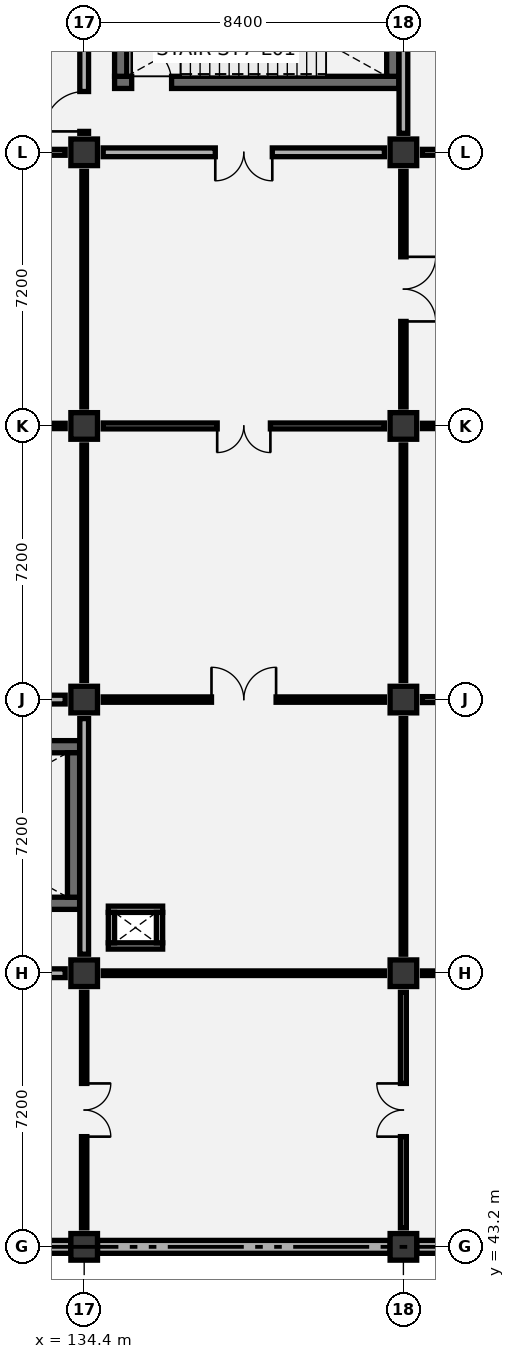
"""IFC4 building model, lengths in metres.
Left out: names, types, materials, properties, quantities, classifications, styles, units other than length and angle.
Written with IfcOpenShell. Run it as: python <this file> out.ifc"""

import sys

from ifc_helpers import new_model, si_unit, direction, frame, frame_2d, origin, origin_2d, place, context, subcontext, project, spatial, rectangle, extrude, element, fill, save


model = new_model("IFC4")
c1 = context("Model", 3, precision=1e-05, world=origin(), true_north=direction((0.0, 1.0)))
c2 = subcontext(c1, "Body", "Model", "MODEL_VIEW")
j1 = project(units=[si_unit("LENGTHUNIT", "METRE"), si_unit("PLANEANGLEUNIT", "RADIAN")], contexts=[c1])
p1 = place(None, origin())
s1 = spatial("IfcSite", under=j1, at=p1, CompositionType="ELEMENT")
p2 = place(p1, origin())
s2 = spatial("IfcBuilding", under=s1, at=p2, CompositionType="ELEMENT")
p3 = place(p2, frame((0.0, 0.0, 6.0)))
s3 = spatial("IfcBuildingStorey", under=s2, at=p3, CompositionType="ELEMENT", Elevation=6.0)
for number, where, z_axis, x_axis in (
    (1, (134.4, 43.2, 0.0), (0.0, 0.0, 1.0), (1.0, 0.0, 0.0)),
    (2, (134.4, 50.4, 0.0), (0.0, 0.0, 1.0), (1.0, 0.0, 0.0)),
    (3, (134.4, 57.6, 0.0), (0.0, 0.0, 1.0), (1.0, 0.0, 0.0)),
    (4, (134.4, 64.8, 0.0), (0.0, 0.0, 1.0), (1.0, 0.0, 0.0)),
    (5, (134.4, 72.0, 0.0), (0.0, 0.0, 1.0), (1.0, 0.0, 0.0)),
    (6, (142.8, 43.2, 0.0), (0.0, 0.0, 1.0), (1.0, 0.0, 0.0)),
    (7, (142.8, 50.4, 0.0), (0.0, 0.0, 1.0), (1.0, 0.0, 0.0)),
    (8, (142.8, 57.6, 0.0), (0.0, 0.0, 1.0), (1.0, 0.0, 0.0)),
    (9, (142.8, 64.8, 0.0), (0.0, 0.0, 1.0), (1.0, 0.0, 0.0)),
    (10, (142.8, 72.0, 0.0), (0.0, 0.0, 1.0), (1.0, 0.0, 0.0)),
):
    element("IfcColumn", number, at=place(p3, frame(where, z_axis=z_axis, x_axis=x_axis)), inside=s3, PredefinedType="COLUMN", context=c2, shape_type="SweptSolid", body=[
        extrude(rectangle(XDim=0.7, YDim=0.7, at=origin_2d()), origin(), (0.0, 0.0, 1.0), 5.4),
    ])
p4 = place(p3, frame((126.8, 52.24, 0.0), z_axis=(0.0, 0.0, 1.0), x_axis=(1.0, 0.0, 0.0)))
e11 = element("IfcWall", 11, at=p4, inside=s3, PredefinedType="SHEAR", context=c2, shape_type="SweptSolid", body=[
    extrude(rectangle(XDim=7.48, YDim=0.32, at=frame_2d((3.74, 0.0))), origin(), (0.0, 0.0, 1.0), 5.075),
])
p5 = place(p4, frame((0.45, 0.0, 0.0)))
e12 = element("IfcOpeningElement", 12, at=p5, cuts=e11, PredefinedType="OPENING", context=c2, shape_type="SweptSolid", body=[
    extrude(rectangle(XDim=1.05, YDim=2.15, at=frame_2d((0.525, 1.075))), frame((0.0, 0.17, 0.0), z_axis=(0.0, -1.0, 0.0), x_axis=(1.0, 0.0, 0.0)), (0.0, 0.0, 1.0), 0.34),
])
p6 = place(p3, frame((126.8, 56.36, 0.0), z_axis=(0.0, 0.0, 1.0), x_axis=(1.0, 0.0, 0.0)))
e13 = element("IfcWall", 13, at=p6, inside=s3, PredefinedType="SHEAR", context=c2, shape_type="SweptSolid", body=[
    extrude(rectangle(XDim=7.48, YDim=0.32, at=frame_2d((3.74, 0.0))), origin(), (0.0, 0.0, 1.0), 5.075),
])
p7 = place(p3, frame((134.12, 52.4, 0.0), z_axis=(0.0, 0.0, 1.0), x_axis=(0.0, 1.0, 0.0)))
e14 = element("IfcWall", 14, at=p7, inside=s3, PredefinedType="SHEAR", context=c2, shape_type="SweptSolid", body=[
    extrude(rectangle(XDim=3.8, YDim=0.32, at=frame_2d((1.9, 0.0))), origin(), (0.0, 0.0, 1.0), 5.075),
])
p8 = place(p3, frame((135.2, 73.84, 0.0), z_axis=(0.0, 0.0, 1.0), x_axis=(1.0, 0.0, 0.0)))
e15 = element("IfcWall", 15, at=p8, inside=s3, PredefinedType="SHEAR", context=c2, shape_type="SweptSolid", body=[
    extrude(rectangle(XDim=7.48, YDim=0.32, at=frame_2d((3.74, 0.0))), origin(), (0.0, 0.0, 1.0), 5.075),
])
p9 = place(p8, frame((0.45, 0.0, 0.0)))
e16 = element("IfcOpeningElement", 16, at=p9, cuts=e15, PredefinedType="OPENING", context=c2, shape_type="SweptSolid", body=[
    extrude(rectangle(XDim=1.05, YDim=2.15, at=frame_2d((0.525, 1.075))), frame((0.0, 0.17, 0.0), z_axis=(0.0, -1.0, 0.0), x_axis=(1.0, 0.0, 0.0)), (0.0, 0.0, 1.0), 0.34),
])
for number, where, z_axis, x_axis in (
    (17, (135.36, 74.0, 0.0), (0.0, 0.0, 1.0), (0.0, 1.0, 0.0)),
    (18, (142.52, 74.0, 0.0), (0.0, 0.0, 1.0), (0.0, 1.0, 0.0)),
):
    element("IfcWall", number, at=place(p3, frame(where, z_axis=z_axis, x_axis=x_axis)), inside=s3, PredefinedType="SHEAR", context=c2, shape_type="SweptSolid", body=[
        extrude(rectangle(XDim=3.8, YDim=0.32, at=frame_2d((1.9, 0.0))), origin(), (0.0, 0.0, 1.0), 5.075),
    ])
for number, where, z_axis, x_axis in (
    (19, (126.35, 43.2, 0.0), (0.0, 0.0, 1.0), (1.0, 0.0, 0.0)),
    (20, (134.75, 43.2, 0.0), (0.0, 0.0, 1.0), (1.0, 0.0, 0.0)),
):
    element("IfcWall", number, at=place(p3, frame(where, z_axis=z_axis, x_axis=x_axis)), inside=s3, PredefinedType="SOLIDWALL", context=c2, shape_type="SweptSolid", body=[
        extrude(rectangle(XDim=7.7, YDim=0.34, at=frame_2d((3.85, 0.0))), origin(), (0.0, 0.0, 1.0), 4.42),
    ])
p10 = place(p3, frame((143.15, 43.2, 0.0), z_axis=(0.0, 0.0, 1.0), x_axis=(1.0, 0.0, 0.0)))
e21 = element("IfcWall", 21, at=p10, inside=s3, PredefinedType="SOLIDWALL", context=c2, shape_type="SweptSolid", body=[
    extrude(rectangle(XDim=7.7, YDim=0.34, at=frame_2d((3.85, 0.0))), origin(), (0.0, 0.0, 1.0), 4.42),
])
for number, where, z_axis, x_axis in (
    (22, (135.035, 51.117, 0.0), (0.0, 0.0, 1.0), (1.0, 0.0, 0.0)),
    (23, (135.035, 52.083, 0.0), (0.0, 0.0, 1.0), (1.0, 0.0, 0.0)),
):
    element("IfcWall", number, at=place(p3, frame(where, z_axis=z_axis, x_axis=x_axis)), inside=s3, PredefinedType="PARTITIONING", context=c2, shape_type="SweptSolid", body=[
        extrude(rectangle(XDim=1.43, YDim=0.165, at=frame_2d((0.715, 0.0))), origin(), (0.0, 0.0, 1.0), 5.075),
    ])
for number, where, z_axis, x_axis in (
    (24, (135.117, 51.2, 0.0), (0.0, 0.0, 1.0), (0.0, 1.0, 0.0)),
    (25, (136.383, 51.2, 0.0), (0.0, 0.0, 1.0), (0.0, 1.0, 0.0)),
):
    element("IfcWall", number, at=place(p3, frame(where, z_axis=z_axis, x_axis=x_axis)), inside=s3, PredefinedType="PARTITIONING", context=c2, shape_type="SweptSolid", body=[
        extrude(rectangle(XDim=0.8, YDim=0.165, at=frame_2d((0.4, 0.0))), origin(), (0.0, 0.0, 1.0), 5.075),
    ])
p11 = place(p3, frame((134.4, 43.7, 0.0), z_axis=(0.0, 0.0, 1.0), x_axis=(0.0, 1.0, 0.0)))
e26 = element("IfcWall", 26, at=p11, inside=s3, PredefinedType="PARTITIONING", context=c2, shape_type="SweptSolid", body=[
    extrude(rectangle(XDim=6.2, YDim=0.14, at=frame_2d((3.1, 0.0))), origin(), (0.0, 0.0, 1.0), 4.32),
])
p12 = place(p11, frame((2.4, 0.0, 0.0)))
e27 = element("IfcOpeningElement", 27, at=p12, cuts=e26, PredefinedType="OPENING", context=c2, shape_type="SweptSolid", body=[
    extrude(rectangle(XDim=1.4, YDim=2.15, at=frame_2d((0.7, 1.075))), frame((0.0, 0.08, 0.0), z_axis=(0.0, -1.0, 0.0), x_axis=(1.0, 0.0, 0.0)), (0.0, 0.0, 1.0), 0.16),
])
p13 = place(p3, frame((126.5, 50.4, 0.0), z_axis=(0.0, 0.0, 1.0), x_axis=(1.0, 0.0, 0.0)))
e28 = element("IfcWall", 28, at=p13, inside=s3, PredefinedType="PARTITIONING", context=c2, shape_type="SweptSolid", body=[
    extrude(rectangle(XDim=7.4, YDim=0.23, at=frame_2d((3.7, 0.0))), origin(), (0.0, 0.0, 1.0), 4.27),
])
p14 = place(p13, frame((2.95, 0.0, 0.0)))
e29 = element("IfcOpeningElement", 29, at=p14, cuts=e28, PredefinedType="OPENING", context=c2, shape_type="SweptSolid", body=[
    extrude(rectangle(XDim=1.5, YDim=2.15, at=frame_2d((0.75, 1.075))), frame((0.0, 0.125, 0.0), z_axis=(0.0, -1.0, 0.0), x_axis=(1.0, 0.0, 0.0)), (0.0, 0.0, 1.0), 0.25),
])
p15 = place(p3, frame((134.4, 50.9, 0.0), z_axis=(0.0, 0.0, 1.0), x_axis=(0.0, 1.0, 0.0)))
e30 = element("IfcWall", 30, at=p15, inside=s3, PredefinedType="PARTITIONING", context=c2, shape_type="SweptSolid", body=[
    extrude(rectangle(XDim=6.2, YDim=0.23, at=frame_2d((3.1, 0.0))), origin(), (0.0, 0.0, 1.0), 4.67),
])
p16 = place(p3, frame((126.5, 57.6, 0.0), z_axis=(0.0, 0.0, 1.0), x_axis=(1.0, 0.0, 0.0)))
e31 = element("IfcWall", 31, at=p16, inside=s3, PredefinedType="PARTITIONING", context=c2, shape_type="SweptSolid", body=[
    extrude(rectangle(XDim=7.4, YDim=0.23, at=frame_2d((3.7, 0.0))), origin(), (0.0, 0.0, 1.0), 4.27),
])
p17 = place(p3, frame((134.4, 58.1, 0.0), z_axis=(0.0, 0.0, 1.0), x_axis=(0.0, 1.0, 0.0)))
e32 = element("IfcWall", 32, at=p17, inside=s3, PredefinedType="PARTITIONING", context=c2, shape_type="SweptSolid", body=[
    extrude(rectangle(XDim=6.2, YDim=0.12, at=frame_2d((3.1, 0.0))), origin(), (0.0, 0.0, 1.0), 4.32),
])
p18 = place(p3, frame((126.5, 64.8, 0.0), z_axis=(0.0, 0.0, 1.0), x_axis=(1.0, 0.0, 0.0)))
e33 = element("IfcWall", 33, at=p18, inside=s3, PredefinedType="PARTITIONING", context=c2, shape_type="SweptSolid", body=[
    extrude(rectangle(XDim=7.4, YDim=0.14, at=frame_2d((3.7, 0.0))), origin(), (0.0, 0.0, 1.0), 4.27),
])
p19 = place(p18, frame((3.0, 0.0, 0.0)))
e34 = element("IfcOpeningElement", 34, at=p19, cuts=e33, PredefinedType="OPENING", context=c2, shape_type="SweptSolid", body=[
    extrude(rectangle(XDim=1.4, YDim=2.15, at=frame_2d((0.7, 1.075))), frame((0.0, 0.08, 0.0), z_axis=(0.0, -1.0, 0.0), x_axis=(1.0, 0.0, 0.0)), (0.0, 0.0, 1.0), 0.16),
])
p20 = place(p3, frame((134.4, 65.3, 0.0), z_axis=(0.0, 0.0, 1.0), x_axis=(0.0, 1.0, 0.0)))
e35 = element("IfcWall", 35, at=p20, inside=s3, PredefinedType="PARTITIONING", context=c2, shape_type="SweptSolid", body=[
    extrude(rectangle(XDim=6.2, YDim=0.12, at=frame_2d((3.1, 0.0))), origin(), (0.0, 0.0, 1.0), 4.78),
])
p21 = place(p3, frame((126.5, 72.0, 0.0), z_axis=(0.0, 0.0, 1.0), x_axis=(1.0, 0.0, 0.0)))
e36 = element("IfcWall", 36, at=p21, inside=s3, PredefinedType="PARTITIONING", context=c2, shape_type="SweptSolid", body=[
    extrude(rectangle(XDim=7.4, YDim=0.155, at=frame_2d((3.7, 0.0))), origin(), (0.0, 0.0, 1.0), 4.27),
])
p22 = place(p21, frame((2.85, 0.0, 0.0)))
e37 = element("IfcOpeningElement", 37, at=p22, cuts=e36, PredefinedType="OPENING", context=c2, shape_type="SweptSolid", body=[
    extrude(rectangle(XDim=1.7, YDim=2.25, at=frame_2d((0.85, 1.125))), frame((0.0, 0.087, 0.0), z_axis=(0.0, -1.0, 0.0), x_axis=(1.0, 0.0, 0.0)), (0.0, 0.0, 1.0), 0.175),
])
p23 = place(p3, frame((134.4, 72.5, 0.0), z_axis=(0.0, 0.0, 1.0), x_axis=(0.0, 1.0, 0.0)))
e38 = element("IfcWall", 38, at=p23, inside=s3, PredefinedType="PARTITIONING", context=c2, shape_type="SweptSolid", body=[
    extrude(rectangle(XDim=6.2, YDim=0.23, at=frame_2d((3.1, 0.0))), origin(), (0.0, 0.0, 1.0), 4.32),
])
p24 = place(p23, frame((0.05, 0.0, 0.0)))
e39 = element("IfcOpeningElement", 39, at=p24, cuts=e38, PredefinedType="OPENING", context=c2, shape_type="SweptSolid", body=[
    extrude(rectangle(XDim=1.05, YDim=2.15, at=frame_2d((0.525, 1.075))), frame((0.0, 0.125, 0.0), z_axis=(0.0, -1.0, 0.0), x_axis=(1.0, 0.0, 0.0)), (0.0, 0.0, 1.0), 0.25),
])
p25 = place(p3, frame((142.8, 43.7, 0.0), z_axis=(0.0, 0.0, 1.0), x_axis=(0.0, 1.0, 0.0)))
e40 = element("IfcWall", 40, at=p25, inside=s3, PredefinedType="PARTITIONING", context=c2, shape_type="SweptSolid", body=[
    extrude(rectangle(XDim=6.2, YDim=0.155, at=frame_2d((3.1, 0.0))), origin(), (0.0, 0.0, 1.0), 4.67),
])
p26 = place(p25, frame((2.4, 0.0, 0.0)))
e41 = element("IfcOpeningElement", 41, at=p26, cuts=e40, PredefinedType="OPENING", context=c2, shape_type="SweptSolid", body=[
    extrude(rectangle(XDim=1.4, YDim=2.15, at=frame_2d((0.7, 1.075))), frame((0.0, 0.087, 0.0), z_axis=(0.0, -1.0, 0.0), x_axis=(1.0, 0.0, 0.0)), (0.0, 0.0, 1.0), 0.175),
])
p27 = place(p3, frame((134.9, 50.4, 0.0), z_axis=(0.0, 0.0, 1.0), x_axis=(1.0, 0.0, 0.0)))
e42 = element("IfcWall", 42, at=p27, inside=s3, PredefinedType="PARTITIONING", context=c2, shape_type="SweptSolid", body=[
    extrude(rectangle(XDim=7.4, YDim=0.12, at=frame_2d((3.7, 0.0))), origin(), (0.0, 0.0, 1.0), 4.27),
])
p28 = place(p3, frame((142.8, 50.9, 0.0), z_axis=(0.0, 0.0, 1.0), x_axis=(0.0, 1.0, 0.0)))
e43 = element("IfcWall", 43, at=p28, inside=s3, PredefinedType="PARTITIONING", context=c2, shape_type="SweptSolid", body=[
    extrude(rectangle(XDim=6.2, YDim=0.12, at=frame_2d((3.1, 0.0))), origin(), (0.0, 0.0, 1.0), 4.32),
])
p29 = place(p3, frame((134.9, 57.6, 0.0), z_axis=(0.0, 0.0, 1.0), x_axis=(1.0, 0.0, 0.0)))
e44 = element("IfcWall", 44, at=p29, inside=s3, PredefinedType="PARTITIONING", context=c2, shape_type="SweptSolid", body=[
    extrude(rectangle(XDim=7.4, YDim=0.14, at=frame_2d((3.7, 0.0))), origin(), (0.0, 0.0, 1.0), 4.27),
])
p30 = place(p29, frame((2.85, 0.0, 0.0)))
e45 = element("IfcOpeningElement", 45, at=p30, cuts=e44, PredefinedType="OPENING", context=c2, shape_type="SweptSolid", body=[
    extrude(rectangle(XDim=1.7, YDim=2.25, at=frame_2d((0.85, 1.125))), frame((0.0, 0.08, 0.0), z_axis=(0.0, -1.0, 0.0), x_axis=(1.0, 0.0, 0.0)), (0.0, 0.0, 1.0), 0.16),
])
p31 = place(p3, frame((142.8, 58.1, 0.0), z_axis=(0.0, 0.0, 1.0), x_axis=(0.0, 1.0, 0.0)))
e46 = element("IfcWall", 46, at=p31, inside=s3, PredefinedType="PARTITIONING", context=c2, shape_type="SweptSolid", body=[
    extrude(rectangle(XDim=6.2, YDim=0.12, at=frame_2d((3.1, 0.0))), origin(), (0.0, 0.0, 1.0), 4.78),
])
p32 = place(p3, frame((134.9, 64.8, 0.0), z_axis=(0.0, 0.0, 1.0), x_axis=(1.0, 0.0, 0.0)))
e47 = element("IfcWall", 47, at=p32, inside=s3, PredefinedType="PARTITIONING", context=c2, shape_type="SweptSolid", body=[
    extrude(rectangle(XDim=7.4, YDim=0.155, at=frame_2d((3.7, 0.0))), origin(), (0.0, 0.0, 1.0), 4.27),
])
p33 = place(p32, frame((3.0, 0.0, 0.0)))
e48 = element("IfcOpeningElement", 48, at=p33, cuts=e47, PredefinedType="OPENING", context=c2, shape_type="SweptSolid", body=[
    extrude(rectangle(XDim=1.4, YDim=2.15, at=frame_2d((0.7, 1.075))), frame((0.0, 0.087, 0.0), z_axis=(0.0, -1.0, 0.0), x_axis=(1.0, 0.0, 0.0)), (0.0, 0.0, 1.0), 0.175),
])
p34 = place(p3, frame((142.8, 65.3, 0.0), z_axis=(0.0, 0.0, 1.0), x_axis=(0.0, 1.0, 0.0)))
e49 = element("IfcWall", 49, at=p34, inside=s3, PredefinedType="PARTITIONING", context=c2, shape_type="SweptSolid", body=[
    extrude(rectangle(XDim=6.2, YDim=0.14, at=frame_2d((3.1, 0.0))), origin(), (0.0, 0.0, 1.0), 4.32),
])
p35 = place(p34, frame((2.25, 0.0, 0.0)))
e50 = element("IfcOpeningElement", 50, at=p35, cuts=e49, PredefinedType="OPENING", context=c2, shape_type="SweptSolid", body=[
    extrude(rectangle(XDim=1.7, YDim=2.25, at=frame_2d((0.85, 1.125))), frame((0.0, 0.08, 0.0), z_axis=(0.0, -1.0, 0.0), x_axis=(1.0, 0.0, 0.0)), (0.0, 0.0, 1.0), 0.16),
])
p36 = place(p3, frame((134.9, 72.0, 0.0), z_axis=(0.0, 0.0, 1.0), x_axis=(1.0, 0.0, 0.0)))
e51 = element("IfcWall", 51, at=p36, inside=s3, PredefinedType="PARTITIONING", context=c2, shape_type="SweptSolid", body=[
    extrude(rectangle(XDim=7.4, YDim=0.23, at=frame_2d((3.7, 0.0))), origin(), (0.0, 0.0, 1.0), 4.27),
])
p37 = place(p36, frame((2.95, 0.0, 0.0)))
e52 = element("IfcOpeningElement", 52, at=p37, cuts=e51, PredefinedType="OPENING", context=c2, shape_type="SweptSolid", body=[
    extrude(rectangle(XDim=1.5, YDim=2.15, at=frame_2d((0.75, 1.075))), frame((0.0, 0.125, 0.0), z_axis=(0.0, -1.0, 0.0), x_axis=(1.0, 0.0, 0.0)), (0.0, 0.0, 1.0), 0.25),
])
p38 = place(p3, frame((142.8, 72.5, 0.0), z_axis=(0.0, 0.0, 1.0), x_axis=(0.0, 1.0, 0.0)))
e53 = element("IfcWall", 53, at=p38, inside=s3, PredefinedType="PARTITIONING", context=c2, shape_type="SweptSolid", body=[
    extrude(rectangle(XDim=6.2, YDim=0.23, at=frame_2d((3.1, 0.0))), origin(), (0.0, 0.0, 1.0), 4.57),
])
p39 = place(p3, frame((143.3, 50.4, 0.0), z_axis=(0.0, 0.0, 1.0), x_axis=(1.0, 0.0, 0.0)))
e54 = element("IfcWall", 54, at=p39, inside=s3, PredefinedType="PARTITIONING", context=c2, shape_type="SweptSolid", body=[
    extrude(rectangle(XDim=7.4, YDim=0.12, at=frame_2d((3.7, 0.0))), origin(), (0.0, 0.0, 1.0), 4.27),
])
p40 = place(p3, frame((143.3, 57.6, 0.0), z_axis=(0.0, 0.0, 1.0), x_axis=(1.0, 0.0, 0.0)))
e55 = element("IfcWall", 55, at=p40, inside=s3, PredefinedType="PARTITIONING", context=c2, shape_type="SweptSolid", body=[
    extrude(rectangle(XDim=7.4, YDim=0.155, at=frame_2d((3.7, 0.0))), origin(), (0.0, 0.0, 1.0), 4.27),
])
p41 = place(p40, frame((3.0, 0.0, 0.0)))
e56 = element("IfcOpeningElement", 56, at=p41, cuts=e55, PredefinedType="OPENING", context=c2, shape_type="SweptSolid", body=[
    extrude(rectangle(XDim=1.4, YDim=2.15, at=frame_2d((0.7, 1.075))), frame((0.0, 0.087, 0.0), z_axis=(0.0, -1.0, 0.0), x_axis=(1.0, 0.0, 0.0)), (0.0, 0.0, 1.0), 0.175),
])
p42 = place(p3, frame((143.3, 64.8, 0.0), z_axis=(0.0, 0.0, 1.0), x_axis=(1.0, 0.0, 0.0)))
e57 = element("IfcWall", 57, at=p42, inside=s3, PredefinedType="PARTITIONING", context=c2, shape_type="SweptSolid", body=[
    extrude(rectangle(XDim=7.4, YDim=0.14, at=frame_2d((3.7, 0.0))), origin(), (0.0, 0.0, 1.0), 4.27),
])
p43 = place(p42, frame((2.85, 0.0, 0.0)))
e58 = element("IfcOpeningElement", 58, at=p43, cuts=e57, PredefinedType="OPENING", context=c2, shape_type="SweptSolid", body=[
    extrude(rectangle(XDim=1.7, YDim=2.25, at=frame_2d((0.85, 1.125))), frame((0.0, 0.08, 0.0), z_axis=(0.0, -1.0, 0.0), x_axis=(1.0, 0.0, 0.0)), (0.0, 0.0, 1.0), 0.16),
])
p44 = place(p3, frame((143.3, 72.0, 0.0), z_axis=(0.0, 0.0, 1.0), x_axis=(1.0, 0.0, 0.0)))
e59 = element("IfcWall", 59, at=p44, inside=s3, PredefinedType="PARTITIONING", context=c2, shape_type="SweptSolid", body=[
    extrude(rectangle(XDim=7.4, YDim=0.155, at=frame_2d((3.7, 0.0))), origin(), (0.0, 0.0, 1.0), 4.27),
])
p45 = place(p44, frame((2.85, 0.0, 0.0)))
e60 = element("IfcOpeningElement", 60, at=p45, cuts=e59, PredefinedType="OPENING", context=c2, shape_type="SweptSolid", body=[
    extrude(rectangle(XDim=1.7, YDim=2.25, at=frame_2d((0.85, 1.125))), frame((0.0, 0.087, 0.0), z_axis=(0.0, -1.0, 0.0), x_axis=(1.0, 0.0, 0.0)), (0.0, 0.0, 1.0), 0.175),
])
p46 = place(p9, origin())
e61 = element("IfcDoor", 61, at=p46, inside=s3, OperationType="SINGLE_SWING_LEFT", PredefinedType="DOOR", context=c2, shape_type="SweptSolid", body=[
    extrude(rectangle(XDim=1.05, YDim=2.15, at=frame_2d((0.525, 1.075))), frame((0.0, 0.025, 0.0), z_axis=(0.0, -1.0, 0.0), x_axis=(1.0, 0.0, 0.0)), (0.0, 0.0, 1.0), 0.05),
])
fill(e16, e61)
p47 = place(p12, frame((1.4, 0.0, 0.0), z_axis=(0.0, 0.0, 1.0), x_axis=(-1.0, 0.0, 0.0)))
e62 = element("IfcDoor", 62, at=p47, inside=s3, OperationType="DOUBLE_DOOR_SINGLE_SWING", PredefinedType="DOOR", context=c2, shape_type="SweptSolid", body=[
    extrude(rectangle(XDim=1.4, YDim=2.15, at=frame_2d((0.7, 1.075))), frame((0.0, 0.025, 0.0), z_axis=(0.0, -1.0, 0.0), x_axis=(1.0, 0.0, 0.0)), (0.0, 0.0, 1.0), 0.05),
])
fill(e27, e62)
p48 = place(p24, origin())
e63 = element("IfcDoor", 63, at=p48, inside=s3, OperationType="SINGLE_SWING_LEFT", PredefinedType="DOOR", context=c2, shape_type="SweptSolid", body=[
    extrude(rectangle(XDim=1.05, YDim=2.15, at=frame_2d((0.525, 1.075))), frame((0.0, 0.025, 0.0), z_axis=(0.0, -1.0, 0.0), x_axis=(1.0, 0.0, 0.0)), (0.0, 0.0, 1.0), 0.05),
])
fill(e39, e63)
p49 = place(p26, origin())
e64 = element("IfcDoor", 64, at=p49, inside=s3, OperationType="DOUBLE_DOOR_SINGLE_SWING", PredefinedType="DOOR", context=c2, shape_type="SweptSolid", body=[
    extrude(rectangle(XDim=1.4, YDim=2.15, at=frame_2d((0.7, 1.075))), frame((0.0, 0.025, 0.0), z_axis=(0.0, -1.0, 0.0), x_axis=(1.0, 0.0, 0.0)), (0.0, 0.0, 1.0), 0.05),
])
fill(e41, e64)
p50 = place(p30, origin())
e65 = element("IfcDoor", 65, at=p50, inside=s3, OperationType="DOUBLE_DOOR_SINGLE_SWING", PredefinedType="DOOR", context=c2, shape_type="SweptSolid", body=[
    extrude(rectangle(XDim=1.7, YDim=2.25, at=frame_2d((0.85, 1.125))), frame((0.0, 0.025, 0.0), z_axis=(0.0, -1.0, 0.0), x_axis=(1.0, 0.0, 0.0)), (0.0, 0.0, 1.0), 0.05),
])
fill(e45, e65)
p51 = place(p33, frame((1.4, 0.0, 0.0), z_axis=(0.0, 0.0, 1.0), x_axis=(-1.0, 0.0, 0.0)))
e66 = element("IfcDoor", 66, at=p51, inside=s3, OperationType="DOUBLE_DOOR_SINGLE_SWING", PredefinedType="DOOR", context=c2, shape_type="SweptSolid", body=[
    extrude(rectangle(XDim=1.4, YDim=2.15, at=frame_2d((0.7, 1.075))), frame((0.0, 0.025, 0.0), z_axis=(0.0, -1.0, 0.0), x_axis=(1.0, 0.0, 0.0)), (0.0, 0.0, 1.0), 0.05),
])
fill(e48, e66)
p52 = place(p35, frame((1.7, 0.0, 0.0), z_axis=(0.0, 0.0, 1.0), x_axis=(-1.0, 0.0, 0.0)))
e67 = element("IfcDoor", 67, at=p52, inside=s3, OperationType="DOUBLE_DOOR_SINGLE_SWING", PredefinedType="DOOR", context=c2, shape_type="SweptSolid", body=[
    extrude(rectangle(XDim=1.7, YDim=2.25, at=frame_2d((0.85, 1.125))), frame((0.0, 0.025, 0.0), z_axis=(0.0, -1.0, 0.0), x_axis=(1.0, 0.0, 0.0)), (0.0, 0.0, 1.0), 0.05),
])
fill(e50, e67)
p53 = place(p37, frame((1.5, 0.0, 0.0), z_axis=(0.0, 0.0, 1.0), x_axis=(-1.0, 0.0, 0.0)))
e68 = element("IfcDoor", 68, at=p53, inside=s3, OperationType="DOUBLE_DOOR_SINGLE_SWING", PredefinedType="DOOR", context=c2, shape_type="SweptSolid", body=[
    extrude(rectangle(XDim=1.5, YDim=2.15, at=frame_2d((0.75, 1.075))), frame((0.0, 0.025, 0.0), z_axis=(0.0, -1.0, 0.0), x_axis=(1.0, 0.0, 0.0)), (0.0, 0.0, 1.0), 0.05),
])
fill(e52, e68)
save(model, sys.argv[1])
